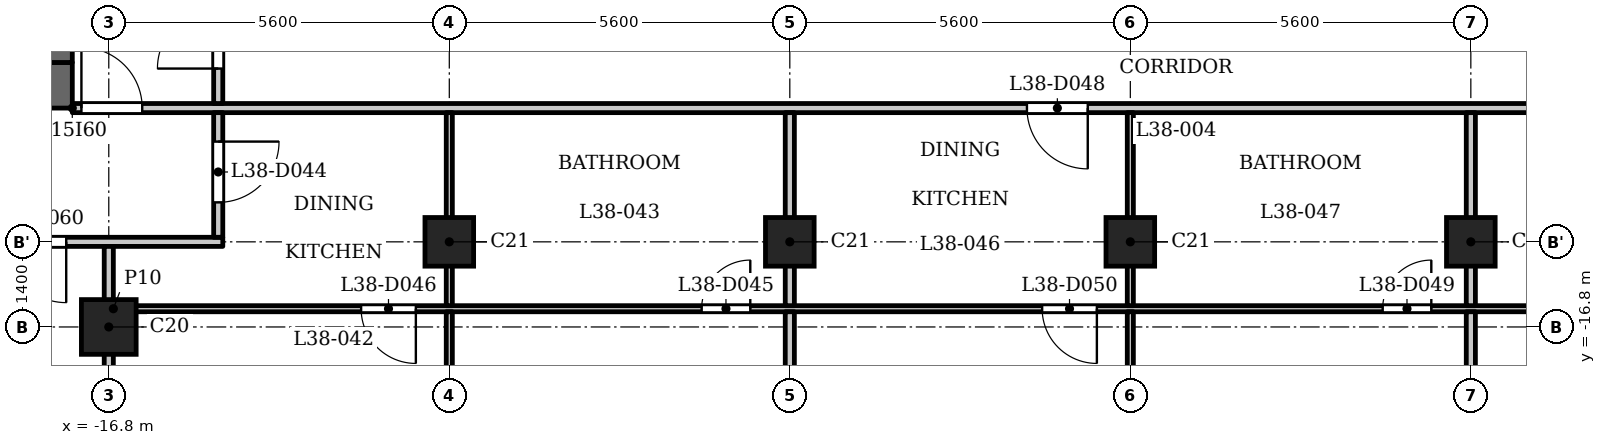
"""IFC4 building model, lengths in metres.
Left out: names, types, materials, properties, quantities, classifications, styles, units other than length and angle.
Written with IfcOpenShell. Run it as: python <this file> out.ifc"""

import sys

from ifc_helpers import new_model, si_unit, direction, frame, frame_2d, origin, origin_2d, place, context, subcontext, project, spatial, rectangle, extrude, element, fill, save


model = new_model("IFC4")
c1 = context("Model", 3, precision=1e-05, world=origin(), true_north=direction((0.0, 1.0)))
c2 = subcontext(c1, "Body", "Model", "MODEL_VIEW")
j1 = project(units=[si_unit("LENGTHUNIT", "METRE"), si_unit("PLANEANGLEUNIT", "RADIAN")], contexts=[c1])
p1 = place(None, origin())
s1 = spatial("IfcSite", under=j1, at=p1, CompositionType="ELEMENT")
p2 = place(p1, origin())
s2 = spatial("IfcBuilding", under=s1, at=p2, CompositionType="ELEMENT")
p3 = place(p2, frame((0.0, 0.0, 150.1)))
s3 = spatial("IfcBuildingStorey", under=s2, at=p3, CompositionType="ELEMENT", Elevation=150.1)
p4 = place(p3, frame((-16.8, -16.8, 0.0), z_axis=(0.0, 0.0, 1.0), x_axis=(1.0, 0.0, 0.0)))
e1 = element("IfcColumn", 1, at=p4, inside=s3, PredefinedType="COLUMN", context=c2, shape_type="SweptSolid", body=[
    extrude(rectangle(XDim=0.9, YDim=0.9, at=origin_2d()), origin(), (0.0, 0.0, 1.0), 3.5),
])
for number, where, z_axis, x_axis in (
    (2, (-11.2, -15.4, 0.0), (0.0, 0.0, 1.0), (1.0, 0.0, 0.0)),
    (3, (-5.6, -15.4, 0.0), (0.0, 0.0, 1.0), (1.0, 0.0, 0.0)),
    (4, (0.0, -15.4, 0.0), (0.0, 0.0, 1.0), (1.0, 0.0, 0.0)),
    (5, (5.6, -15.4, 0.0), (0.0, 0.0, 1.0), (1.0, 0.0, 0.0)),
):
    element("IfcColumn", number, at=place(p3, frame(where, z_axis=z_axis, x_axis=x_axis)), inside=s3, PredefinedType="COLUMN", context=c2, shape_type="SweptSolid", body=[
        extrude(rectangle(XDim=0.8, YDim=0.8, at=origin_2d()), origin(), (0.0, 0.0, 1.0), 3.5),
    ])
p5 = place(p3, frame((-17.4, -12.825, 0.0), z_axis=(0.0, 0.0, 1.0), x_axis=(-1.0, 0.0, 0.0)))
e6 = element("IfcWall", 6, at=p5, inside=s3, PredefinedType="SHEAR", context=c2, shape_type="SweptSolid", body=[
    extrude(rectangle(XDim=10.4, YDim=0.75, at=frame_2d((5.2, 0.0))), origin(), (0.0, 0.0, 1.0), 3.2),
])
p6 = place(p3, frame((-17.6, -12.45, 0.0), z_axis=(0.0, 0.0, 1.0), x_axis=(0.0, 1.0, 0.0)))
e7 = element("IfcWall", 7, at=p6, inside=s3, PredefinedType="SHEAR", context=c2, shape_type="SweptSolid", body=[
    extrude(rectangle(XDim=24.9, YDim=0.4, at=frame_2d((12.45, 0.0))), origin(), (0.0, 0.0, 1.0), 3.2),
])
p7 = place(p6, frame((6.325, 0.0, 0.0)))
e8 = element("IfcOpeningElement", 8, at=p7, cuts=e7, PredefinedType="OPENING", context=c2, shape_type="SweptSolid", body=[
    extrude(rectangle(XDim=0.9, YDim=2.1, at=frame_2d((0.45, 1.05))), frame((0.0, 0.21, 0.0), z_axis=(0.0, -1.0, 0.0), x_axis=(1.0, 0.0, 0.0)), (0.0, 0.0, 1.0), 0.42),
])
p8 = place(p6, frame((9.925, 0.0, 0.0)))
e9 = element("IfcOpeningElement", 9, at=p8, cuts=e7, PredefinedType="OPENING", context=c2, shape_type="SweptSolid", body=[
    extrude(rectangle(XDim=0.9, YDim=2.1, at=frame_2d((0.45, 1.05))), frame((0.0, 0.21, 0.0), z_axis=(0.0, -1.0, 0.0), x_axis=(1.0, 0.0, 0.0)), (0.0, 0.0, 1.0), 0.42),
])
p9 = place(p6, frame((15.6, 0.0, 0.0)))
e10 = element("IfcOpeningElement", 10, at=p9, cuts=e7, PredefinedType="OPENING", context=c2, shape_type="SweptSolid", body=[
    extrude(rectangle(XDim=1.1, YDim=2.1, at=frame_2d((0.55, 1.05))), frame((0.0, 0.21, 0.0), z_axis=(0.0, -1.0, 0.0), x_axis=(1.0, 0.0, 0.0)), (0.0, 0.0, 1.0), 0.42),
])
p10 = place(p6, frame((18.0, 0.0, 0.0)))
e11 = element("IfcOpeningElement", 11, at=p10, cuts=e7, PredefinedType="OPENING", context=c2, shape_type="SweptSolid", body=[
    extrude(rectangle(XDim=1.1, YDim=2.1, at=frame_2d((0.55, 1.05))), frame((0.0, 0.21, 0.0), z_axis=(0.0, -1.0, 0.0), x_axis=(1.0, 0.0, 0.0)), (0.0, 0.0, 1.0), 0.42),
])
p11 = place(p6, frame((23.025, 0.0, 0.0)))
e12 = element("IfcOpeningElement", 12, at=p11, cuts=e7, PredefinedType="OPENING", context=c2, shape_type="SweptSolid", body=[
    extrude(rectangle(XDim=1.1, YDim=2.1, at=frame_2d((0.55, 1.05))), frame((0.0, 0.21, 0.0), z_axis=(0.0, -1.0, 0.0), x_axis=(1.0, 0.0, 0.0)), (0.0, 0.0, 1.0), 0.42),
])
p12 = place(p6, frame((0.775, 0.0, 0.0)))
e13 = element("IfcOpeningElement", 13, at=p12, cuts=e7, PredefinedType="OPENING", context=c2, shape_type="SweptSolid", body=[
    extrude(rectangle(XDim=1.1, YDim=2.1, at=frame_2d((0.55, 1.05))), frame((0.0, 0.21, 0.0), z_axis=(0.0, -1.0, 0.0), x_axis=(1.0, 0.0, 0.0)), (0.0, 0.0, 1.0), 0.42),
])
p13 = place(p6, frame((12.925, 0.0, 0.0)))
e14 = element("IfcOpeningElement", 14, at=p13, cuts=e7, PredefinedType="OPENING", context=c2, shape_type="SweptSolid", body=[
    extrude(rectangle(XDim=1.8, YDim=2.1, at=frame_2d((0.9, 1.05))), frame((0.0, 0.21, 0.0), z_axis=(0.0, -1.0, 0.0), x_axis=(1.0, 0.0, 0.0)), (0.0, 0.0, 1.0), 0.42),
])
p14 = place(p3, frame((-16.725, -16.5, 0.0), z_axis=(0.0, 0.0, 1.0), x_axis=(1.0, 0.0, 0.0)))
e15 = element("IfcWall", 15, at=p14, inside=s3, PredefinedType="PARTITIONING", context=c2, shape_type="SweptSolid", body=[
    extrude(rectangle(XDim=33.45, YDim=0.1, at=frame_2d((16.725, 0.0))), origin(), (0.0, 0.0, 1.0), 3.2),
])
p15 = place(p14, frame((9.675, 0.0, 0.0)))
e16 = element("IfcOpeningElement", 16, at=p15, cuts=e15, PredefinedType="OPENING", context=c2, shape_type="SweptSolid", body=[
    extrude(rectangle(XDim=0.8, YDim=2.1, at=frame_2d((0.4, 1.05))), frame((0.0, 0.06, 0.0), z_axis=(0.0, -1.0, 0.0), x_axis=(1.0, 0.0, 0.0)), (0.0, 0.0, 1.0), 0.12),
])
p16 = place(p14, frame((4.075, 0.0, 0.0)))
e17 = element("IfcOpeningElement", 17, at=p16, cuts=e15, PredefinedType="OPENING", context=c2, shape_type="SweptSolid", body=[
    extrude(rectangle(XDim=0.9, YDim=2.1, at=frame_2d((0.45, 1.05))), frame((0.0, 0.06, 0.0), z_axis=(0.0, -1.0, 0.0), x_axis=(1.0, 0.0, 0.0)), (0.0, 0.0, 1.0), 0.12),
])
p17 = place(p14, frame((20.875, 0.0, 0.0)))
e18 = element("IfcOpeningElement", 18, at=p17, cuts=e15, PredefinedType="OPENING", context=c2, shape_type="SweptSolid", body=[
    extrude(rectangle(XDim=0.8, YDim=2.1, at=frame_2d((0.4, 1.05))), frame((0.0, 0.06, 0.0), z_axis=(0.0, -1.0, 0.0), x_axis=(1.0, 0.0, 0.0)), (0.0, 0.0, 1.0), 0.12),
])
p18 = place(p14, frame((15.275, 0.0, 0.0)))
e19 = element("IfcOpeningElement", 19, at=p18, cuts=e15, PredefinedType="OPENING", context=c2, shape_type="SweptSolid", body=[
    extrude(rectangle(XDim=0.9, YDim=2.1, at=frame_2d((0.45, 1.05))), frame((0.0, 0.06, 0.0), z_axis=(0.0, -1.0, 0.0), x_axis=(1.0, 0.0, 0.0)), (0.0, 0.0, 1.0), 0.12),
])
p19 = place(p14, frame((26.475, 0.0, 0.0)))
e20 = element("IfcOpeningElement", 20, at=p19, cuts=e15, PredefinedType="OPENING", context=c2, shape_type="SweptSolid", body=[
    extrude(rectangle(XDim=0.8, YDim=2.1, at=frame_2d((0.4, 1.05))), frame((0.0, 0.06, 0.0), z_axis=(0.0, -1.0, 0.0), x_axis=(1.0, 0.0, 0.0)), (0.0, 0.0, 1.0), 0.12),
])
p20 = place(p14, frame((30.575, 0.0, 0.0)))
e21 = element("IfcOpeningElement", 21, at=p20, cuts=e15, PredefinedType="OPENING", context=c2, shape_type="SweptSolid", body=[
    extrude(rectangle(XDim=0.9, YDim=2.1, at=frame_2d((0.45, 1.05))), frame((0.0, 0.06, 0.0), z_axis=(0.0, -1.0, 0.0), x_axis=(1.0, 0.0, 0.0)), (0.0, 0.0, 1.0), 0.12),
])
p21 = place(p3, frame((-27.484, -15.4, 0.0), z_axis=(0.0, 0.0, 1.0), x_axis=(1.0, 0.0, 0.0)))
e22 = element("IfcWall", 22, at=p21, inside=s3, PredefinedType="PARTITIONING", context=c2, shape_type="SweptSolid", body=[
    extrude(rectangle(XDim=12.559, YDim=0.15, at=frame_2d((6.279, 0.0))), origin(), (0.0, 0.0, 1.0), 3.2),
])
p22 = place(p21, frame((8.984, 0.0, 0.0)))
e23 = element("IfcOpeningElement", 23, at=p22, cuts=e22, PredefinedType="OPENING", context=c2, shape_type="SweptSolid", body=[
    extrude(rectangle(XDim=1.0, YDim=2.1, at=frame_2d((0.5, 1.05))), frame((0.0, 0.085, 0.0), z_axis=(0.0, -1.0, 0.0), x_axis=(1.0, 0.0, 0.0)), (0.0, 0.0, 1.0), 0.17),
])
p23 = place(p3, frame((-17.4, -13.2, 0.0), z_axis=(0.0, 0.0, 1.0), x_axis=(1.0, 0.0, 0.0)))
e24 = element("IfcWall", 24, at=p23, inside=s3, PredefinedType="PARTITIONING", context=c2, shape_type="SweptSolid", body=[
    extrude(rectangle(XDim=34.8, YDim=0.15, at=frame_2d((17.4, 0.0))), origin(), (0.0, 0.0, 1.0), 3.2),
])
p24 = place(p23, frame((0.15, 0.0, 0.0)))
e25 = element("IfcOpeningElement", 25, at=p24, cuts=e24, PredefinedType="OPENING", context=c2, shape_type="SweptSolid", body=[
    extrude(rectangle(XDim=1.0, YDim=2.1, at=frame_2d((0.5, 1.05))), frame((0.0, 0.085, 0.0), z_axis=(0.0, -1.0, 0.0), x_axis=(1.0, 0.0, 0.0)), (0.0, 0.0, 1.0), 0.17),
])
p25 = place(p23, frame((33.55, 0.0, 0.0)))
e26 = element("IfcOpeningElement", 26, at=p25, cuts=e24, PredefinedType="OPENING", context=c2, shape_type="SweptSolid", body=[
    extrude(rectangle(XDim=1.0, YDim=2.1, at=frame_2d((0.5, 1.05))), frame((0.0, 0.085, 0.0), z_axis=(0.0, -1.0, 0.0), x_axis=(1.0, 0.0, 0.0)), (0.0, 0.0, 1.0), 0.17),
])
p26 = place(p23, frame((15.7, 0.0, 0.0)))
e27 = element("IfcOpeningElement", 27, at=p26, cuts=e24, PredefinedType="OPENING", context=c2, shape_type="SweptSolid", body=[
    extrude(rectangle(XDim=1.0, YDim=2.1, at=frame_2d((0.5, 1.05))), frame((0.0, 0.085, 0.0), z_axis=(0.0, -1.0, 0.0), x_axis=(1.0, 0.0, 0.0)), (0.0, 0.0, 1.0), 0.17),
])
p27 = place(p3, frame((-16.8, -22.93, 0.0), z_axis=(0.0, 0.0, 1.0), x_axis=(0.0, 1.0, 0.0)))
e28 = element("IfcWall", 28, at=p27, inside=s3, PredefinedType="PARTITIONING", context=c2, shape_type="SweptSolid", body=[
    extrude(rectangle(XDim=7.455, YDim=0.15, at=frame_2d((3.728, 0.0))), origin(), (0.0, 0.0, 1.0), 3.2),
])
p28 = place(p3, frame((-15.0, -15.325, 0.0), z_axis=(0.0, 0.0, 1.0), x_axis=(0.0, 1.0, 0.0)))
e29 = element("IfcWall", 29, at=p28, inside=s3, PredefinedType="PARTITIONING", context=c2, shape_type="SweptSolid", body=[
    extrude(rectangle(XDim=2.05, YDim=0.15, at=frame_2d((1.025, 0.0))), origin(), (0.0, 0.0, 1.0), 3.2),
])
p29 = place(p28, frame((0.574, 0.0, 0.0)))
e30 = element("IfcOpeningElement", 30, at=p29, cuts=e29, PredefinedType="OPENING", context=c2, shape_type="SweptSolid", body=[
    extrude(rectangle(XDim=1.0, YDim=2.1, at=frame_2d((0.5, 1.05))), frame((0.0, 0.085, 0.0), z_axis=(0.0, -1.0, 0.0), x_axis=(1.0, 0.0, 0.0)), (0.0, 0.0, 1.0), 0.17),
])
p30 = place(p3, frame((-15.0, -13.125, 0.0), z_axis=(0.0, 0.0, 1.0), x_axis=(0.0, 1.0, 0.0)))
e31 = element("IfcWall", 31, at=p30, inside=s3, PredefinedType="PARTITIONING", context=c2, shape_type="SweptSolid", body=[
    extrude(rectangle(XDim=6.356, YDim=0.15, at=frame_2d((3.178, 0.0))), origin(), (0.0, 0.0, 1.0), 3.2),
])
p31 = place(p30, frame((0.575, 0.0, 0.0)))
e32 = element("IfcOpeningElement", 32, at=p31, cuts=e31, PredefinedType="OPENING", context=c2, shape_type="SweptSolid", body=[
    extrude(rectangle(XDim=1.0, YDim=2.1, at=frame_2d((0.5, 1.05))), frame((0.0, 0.085, 0.0), z_axis=(0.0, -1.0, 0.0), x_axis=(1.0, 0.0, 0.0)), (0.0, 0.0, 1.0), 0.17),
])
p32 = place(p3, frame((-11.2, -22.93, 0.0), z_axis=(0.0, 0.0, 1.0), x_axis=(0.0, 1.0, 0.0)))
e33 = element("IfcWall", 33, at=p32, inside=s3, PredefinedType="PARTITIONING", context=c2, shape_type="SweptSolid", body=[
    extrude(rectangle(XDim=6.38, YDim=0.1, at=frame_2d((3.19, 0.0))), origin(), (0.0, 0.0, 1.0), 3.2),
])
p33 = place(p32, frame((1.27, 0.0, 0.0)))
e34 = element("IfcOpeningElement", 34, at=p33, cuts=e33, PredefinedType="OPENING", context=c2, shape_type="SweptSolid", body=[
    extrude(rectangle(XDim=0.9, YDim=2.1, at=frame_2d((0.45, 1.05))), frame((0.0, 0.06, 0.0), z_axis=(0.0, -1.0, 0.0), x_axis=(1.0, 0.0, 0.0)), (0.0, 0.0, 1.0), 0.12),
])
p34 = place(p3, frame((-11.2, -16.45, 0.0), z_axis=(0.0, 0.0, 1.0), x_axis=(0.0, 1.0, 0.0)))
e35 = element("IfcWall", 35, at=p34, inside=s3, PredefinedType="PARTITIONING", context=c2, shape_type="SweptSolid", body=[
    extrude(rectangle(XDim=3.175, YDim=0.1, at=frame_2d((1.587, 0.0))), origin(), (0.0, 0.0, 1.0), 3.2),
])
p35 = place(p3, frame((-5.6, -22.93, 0.0), z_axis=(0.0, 0.0, 1.0), x_axis=(0.0, 1.0, 0.0)))
e36 = element("IfcWall", 36, at=p35, inside=s3, PredefinedType="PARTITIONING", context=c2, shape_type="SweptSolid", body=[
    extrude(rectangle(XDim=6.38, YDim=0.15, at=frame_2d((3.19, 0.0))), origin(), (0.0, 0.0, 1.0), 3.2),
])
p36 = place(p3, frame((-5.6, -16.45, 0.0), z_axis=(0.0, 0.0, 1.0), x_axis=(0.0, 1.0, 0.0)))
e37 = element("IfcWall", 37, at=p36, inside=s3, PredefinedType="PARTITIONING", context=c2, shape_type="SweptSolid", body=[
    extrude(rectangle(XDim=3.175, YDim=0.15, at=frame_2d((1.587, 0.0))), origin(), (0.0, 0.0, 1.0), 3.2),
])
p37 = place(p3, frame((0.0, -22.93, 0.0), z_axis=(0.0, 0.0, 1.0), x_axis=(0.0, 1.0, 0.0)))
e38 = element("IfcWall", 38, at=p37, inside=s3, PredefinedType="PARTITIONING", context=c2, shape_type="SweptSolid", body=[
    extrude(rectangle(XDim=6.38, YDim=0.1, at=frame_2d((3.19, 0.0))), origin(), (0.0, 0.0, 1.0), 3.2),
])
p38 = place(p37, frame((1.27, 0.0, 0.0)))
e39 = element("IfcOpeningElement", 39, at=p38, cuts=e38, PredefinedType="OPENING", context=c2, shape_type="SweptSolid", body=[
    extrude(rectangle(XDim=0.9, YDim=2.1, at=frame_2d((0.45, 1.05))), frame((0.0, 0.06, 0.0), z_axis=(0.0, -1.0, 0.0), x_axis=(1.0, 0.0, 0.0)), (0.0, 0.0, 1.0), 0.12),
])
p39 = place(p3, frame((0.0, -16.45, 0.0), z_axis=(0.0, 0.0, 1.0), x_axis=(0.0, 1.0, 0.0)))
e40 = element("IfcWall", 40, at=p39, inside=s3, PredefinedType="PARTITIONING", context=c2, shape_type="SweptSolid", body=[
    extrude(rectangle(XDim=3.175, YDim=0.1, at=frame_2d((1.587, 0.0))), origin(), (0.0, 0.0, 1.0), 3.2),
])
p40 = place(p3, frame((5.6, -22.93, 0.0), z_axis=(0.0, 0.0, 1.0), x_axis=(0.0, 1.0, 0.0)))
e41 = element("IfcWall", 41, at=p40, inside=s3, PredefinedType="PARTITIONING", context=c2, shape_type="SweptSolid", body=[
    extrude(rectangle(XDim=6.38, YDim=0.15, at=frame_2d((3.19, 0.0))), origin(), (0.0, 0.0, 1.0), 3.2),
])
p41 = place(p3, frame((5.6, -16.45, 0.0), z_axis=(0.0, 0.0, 1.0), x_axis=(0.0, 1.0, 0.0)))
e42 = element("IfcWall", 42, at=p41, inside=s3, PredefinedType="PARTITIONING", context=c2, shape_type="SweptSolid", body=[
    extrude(rectangle(XDim=3.175, YDim=0.15, at=frame_2d((1.587, 0.0))), origin(), (0.0, 0.0, 1.0), 3.2),
])
p42 = place(p31, origin())
e43 = element("IfcDoor", 43, at=p42, inside=s3, OperationType="SINGLE_SWING_RIGHT", PredefinedType="DOOR", context=c2, shape_type="SweptSolid", body=[
    extrude(rectangle(XDim=1.0, YDim=2.1, at=frame_2d((0.5, 1.05))), frame((0.0, 0.025, 0.0), z_axis=(0.0, -1.0, 0.0), x_axis=(1.0, 0.0, 0.0)), (0.0, 0.0, 1.0), 0.05),
])
fill(e32, e43)
p43 = place(p24, origin())
e44 = element("IfcDoor", 44, at=p43, inside=s3, OperationType="SINGLE_SWING_RIGHT", PredefinedType="DOOR", context=c2, shape_type="SweptSolid", body=[
    extrude(rectangle(XDim=1.0, YDim=2.1, at=frame_2d((0.5, 1.05))), frame((0.0, 0.025, 0.0), z_axis=(0.0, -1.0, 0.0), x_axis=(1.0, 0.0, 0.0)), (0.0, 0.0, 1.0), 0.05),
])
fill(e25, e44)
p44 = place(p29, origin())
e45 = element("IfcDoor", 45, at=p44, inside=s3, OperationType="SINGLE_SWING_RIGHT", PredefinedType="DOOR", context=c2, shape_type="SweptSolid", body=[
    extrude(rectangle(XDim=1.0, YDim=2.1, at=frame_2d((0.5, 1.05))), frame((0.0, 0.025, 0.0), z_axis=(0.0, -1.0, 0.0), x_axis=(1.0, 0.0, 0.0)), (0.0, 0.0, 1.0), 0.05),
])
fill(e30, e45)
p45 = place(p15, origin())
e46 = element("IfcDoor", 46, at=p45, inside=s3, OperationType="SINGLE_SWING_LEFT", PredefinedType="DOOR", context=c2, shape_type="SweptSolid", body=[
    extrude(rectangle(XDim=0.8, YDim=2.1, at=frame_2d((0.4, 1.05))), frame((0.0, 0.025, 0.0), z_axis=(0.0, -1.0, 0.0), x_axis=(1.0, 0.0, 0.0)), (0.0, 0.0, 1.0), 0.05),
])
fill(e16, e46)
p46 = place(p16, origin())
e47 = element("IfcDoor", 47, at=p46, inside=s3, OperationType="SINGLE_SWING_RIGHT", PredefinedType="DOOR", context=c2, shape_type="SweptSolid", body=[
    extrude(rectangle(XDim=0.9, YDim=2.1, at=frame_2d((0.45, 1.05))), frame((0.0, 0.025, 0.0), z_axis=(0.0, -1.0, 0.0), x_axis=(1.0, 0.0, 0.0)), (0.0, 0.0, 1.0), 0.05),
])
fill(e17, e47)
p47 = place(p26, origin())
e48 = element("IfcDoor", 48, at=p47, inside=s3, OperationType="SINGLE_SWING_RIGHT", PredefinedType="DOOR", context=c2, shape_type="SweptSolid", body=[
    extrude(rectangle(XDim=1.0, YDim=2.1, at=frame_2d((0.5, 1.05))), frame((0.0, 0.025, 0.0), z_axis=(0.0, -1.0, 0.0), x_axis=(1.0, 0.0, 0.0)), (0.0, 0.0, 1.0), 0.05),
])
fill(e27, e48)
p48 = place(p17, origin())
e49 = element("IfcDoor", 49, at=p48, inside=s3, OperationType="SINGLE_SWING_LEFT", PredefinedType="DOOR", context=c2, shape_type="SweptSolid", body=[
    extrude(rectangle(XDim=0.8, YDim=2.1, at=frame_2d((0.4, 1.05))), frame((0.0, 0.025, 0.0), z_axis=(0.0, -1.0, 0.0), x_axis=(1.0, 0.0, 0.0)), (0.0, 0.0, 1.0), 0.05),
])
fill(e18, e49)
p49 = place(p18, origin())
e50 = element("IfcDoor", 50, at=p49, inside=s3, OperationType="SINGLE_SWING_RIGHT", PredefinedType="DOOR", context=c2, shape_type="SweptSolid", body=[
    extrude(rectangle(XDim=0.9, YDim=2.1, at=frame_2d((0.45, 1.05))), frame((0.0, 0.025, 0.0), z_axis=(0.0, -1.0, 0.0), x_axis=(1.0, 0.0, 0.0)), (0.0, 0.0, 1.0), 0.05),
])
fill(e19, e50)
p50 = place(p22, origin())
e51 = element("IfcDoor", 51, at=p50, inside=s3, OperationType="SINGLE_SWING_RIGHT", PredefinedType="DOOR", context=c2, shape_type="SweptSolid", body=[
    extrude(rectangle(XDim=1.0, YDim=2.1, at=frame_2d((0.5, 1.05))), frame((0.0, 0.025, 0.0), z_axis=(0.0, -1.0, 0.0), x_axis=(1.0, 0.0, 0.0)), (0.0, 0.0, 1.0), 0.05),
])
fill(e23, e51)
save(model, sys.argv[1])
